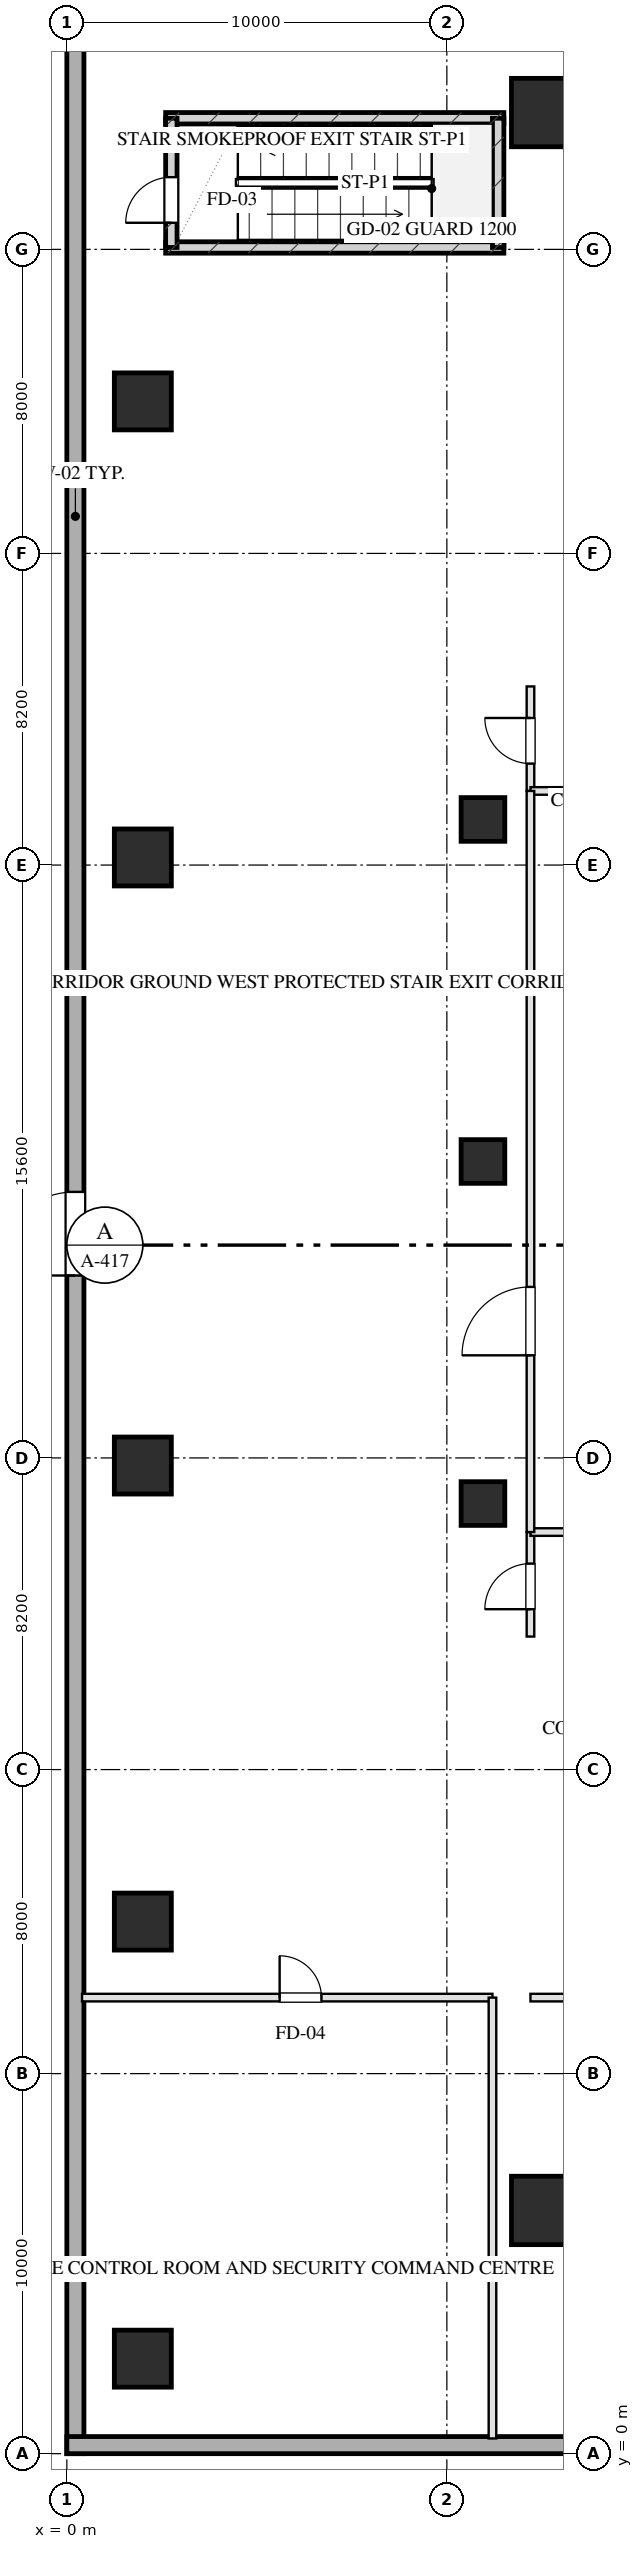
"""IFC4 building model, lengths in metres.
Left out: names, types, materials, properties, quantities, classifications, styles, units other than length and angle.
Written with IfcOpenShell. Run it as: python <this file> out.ifc"""

import sys

from ifc_helpers import new_model, si_unit, direction, frame, frame_2d, origin, origin_2d, place, context, subcontext, project, spatial, rectangle, hollow_rectangle, extrude, element, fill, save


model = new_model("IFC4")
c1 = context("Model", 3, precision=1e-05, world=origin(), true_north=direction((0.0, 1.0)))
c2 = subcontext(c1, "Body", "Model", "MODEL_VIEW")
j1 = project(units=[si_unit("LENGTHUNIT", "METRE"), si_unit("PLANEANGLEUNIT", "RADIAN")], contexts=[c1])
p1 = place(None, origin())
s1 = spatial("IfcSite", under=j1, at=p1, CompositionType="ELEMENT")
p2 = place(p1, origin())
s2 = spatial("IfcBuilding", under=s1, at=p2, CompositionType="ELEMENT")
p3 = place(p2, origin())
s3 = spatial("IfcBuildingStorey", under=s2, at=p3, CompositionType="ELEMENT", Elevation=0.0)
for number, where, z_axis, x_axis in (
    (1, (2.6, 58.05, 0.0), (0.0, 0.0, 1.0), (1.0, 0.0, 0.0)),
    (2, (2.6, 61.45, 0.0), (0.0, 0.0, 1.0), (1.0, 0.0, 0.0)),
):
    element("IfcWall", number, at=place(p3, frame(where, z_axis=z_axis, x_axis=x_axis)), inside=s3, PredefinedType="SHEAR", context=c2, shape_type="SweptSolid", body=[
        extrude(rectangle(XDim=8.9, YDim=0.3, at=frame_2d((4.45, 0.0))), origin(), (0.0, 0.0, 1.0), 6.0),
    ])
p4 = place(p3, frame((11.35, 58.05, 0.0), z_axis=(0.0, 0.0, 1.0), x_axis=(0.0, 1.0, 0.0)))
e3 = element("IfcWall", 3, at=p4, inside=s3, PredefinedType="SHEAR", context=c2, shape_type="SweptSolid", body=[
    extrude(rectangle(XDim=3.4, YDim=0.3, at=frame_2d((1.7, 0.0))), origin(), (0.0, 0.0, 1.0), 6.0),
])
p5 = place(p3, frame((2.75, 58.05, 0.0), z_axis=(0.0, 0.0, 1.0), x_axis=(0.0, 1.0, 0.0)))
e4 = element("IfcWall", 4, at=p5, inside=s3, PredefinedType="SHEAR", context=c2, shape_type="SweptSolid", body=[
    extrude(rectangle(XDim=3.4, YDim=0.3, at=frame_2d((1.7, 0.0))), origin(), (0.0, 0.0, 1.0), 6.0),
])
p6 = place(p5, frame((0.65, 0.0, 0.0)))
e5 = element("IfcOpeningElement", 5, at=p6, cuts=e4, PredefinedType="OPENING", context=c2, shape_type="SweptSolid", body=[
    extrude(rectangle(XDim=1.2, YDim=2.05, at=frame_2d((0.6, 1.025))), frame((0.0, 0.16, 0.0), z_axis=(0.0, -1.0, 0.0), x_axis=(1.0, 0.0, 0.0)), (0.0, 0.0, 1.0), 0.32),
])
for number, where, z_axis, x_axis in (
    (6, (2.0, 2.5, 0.0), (0.0, 0.0, 1.0), (1.0, 0.0, 0.0)),
    (7, (2.0, 14.0, 0.0), (0.0, 0.0, 1.0), (1.0, 0.0, 0.0)),
    (8, (2.0, 26.0, 0.0), (0.0, 0.0, 1.0), (1.0, 0.0, 0.0)),
    (9, (2.0, 42.0, 0.0), (0.0, 0.0, 1.0), (1.0, 0.0, 0.0)),
    (10, (2.0, 54.0, 0.0), (0.0, 0.0, 1.0), (1.0, 0.0, 0.0)),
):
    element("IfcColumn", number, at=place(p3, frame(where, z_axis=z_axis, x_axis=x_axis)), inside=s3, PredefinedType="COLUMN", context=c2, shape_type="SweptSolid", body=[
        extrude(rectangle(XDim=1.5, YDim=1.5, at=origin_2d()), origin(), (0.0, 0.0, 1.0), 6.001),
    ])
for number, where, z_axis, x_axis in (
    (11, (12.6, 6.4, 0.0), (0.0, 0.0, 1.0), (1.0, 0.0, 0.0)),
    (12, (12.6, 61.6, 0.0), (0.0, 0.0, 1.0), (1.0, 0.0, 0.0)),
):
    element("IfcColumn", number, at=place(p3, frame(where, z_axis=z_axis, x_axis=x_axis)), inside=s3, PredefinedType="COLUMN", context=c2, shape_type="SweptSolid", body=[
        extrude(hollow_rectangle(XDim=1.8, YDim=1.8, WallThickness=0.06, at=origin_2d()), origin(), (0.0, 0.0, 1.0), 6.001),
    ])
for number, where, z_axis, x_axis in (
    (13, (10.95, 25.0, 0.0), (0.0, 0.0, 1.0), (1.0, 0.0, 0.0)),
    (14, (10.95, 34.0, 0.0), (0.0, 0.0, 1.0), (1.0, 0.0, 0.0)),
    (15, (10.95, 43.0, 0.0), (0.0, 0.0, 1.0), (1.0, 0.0, 0.0)),
):
    element("IfcColumn", number, at=place(p3, frame(where, z_axis=z_axis, x_axis=x_axis)), inside=s3, PredefinedType="COLUMN", context=c2, shape_type="SweptSolid", body=[
        extrude(hollow_rectangle(XDim=1.15, YDim=1.15, WallThickness=0.04, at=origin_2d()), origin(), (0.0, 0.0, 1.0), 6.001),
    ])
p7 = place(p3, frame((0.225, 0.0, 0.0), z_axis=(0.0, 0.0, 1.0), x_axis=(0.0, 1.0, 0.0)))
e16 = element("IfcWall", 16, at=p7, inside=s3, PredefinedType="SOLIDWALL", context=c2, shape_type="SweptSolid", body=[
    extrude(rectangle(XDim=68.0, YDim=0.45, at=frame_2d((34.0, 0.0))), origin(), (0.0, 0.0, 1.0), 5.7),
])
p8 = place(p7, frame((31.0, 0.0, 0.0)))
e17 = element("IfcOpeningElement", 17, at=p8, cuts=e16, PredefinedType="OPENING", context=c2, shape_type="SweptSolid", body=[
    extrude(rectangle(XDim=2.2, YDim=2.4, at=frame_2d((1.1, 1.2))), frame((0.0, 0.235, 0.0), z_axis=(0.0, -1.0, 0.0), x_axis=(1.0, 0.0, 0.0)), (0.0, 0.0, 1.0), 0.47),
])
p9 = place(p3, frame((120.0, 0.225, 0.0), z_axis=(0.0, 0.0, 1.0), x_axis=(-1.0, 0.0, 0.0)))
e18 = element("IfcWall", 18, at=p9, inside=s3, PredefinedType="SOLIDWALL", context=c2, shape_type="SweptSolid", body=[
    extrude(rectangle(XDim=120.0, YDim=0.45, at=frame_2d((60.0, 0.0))), origin(), (0.0, 0.0, 1.0), 5.7),
])
p10 = place(p9, frame((13.0, 0.0, 0.0)))
e19 = element("IfcOpeningElement", 19, at=p10, cuts=e18, PredefinedType="OPENING", context=c2, shape_type="SweptSolid", body=[
    extrude(rectangle(XDim=2.2, YDim=2.4, at=frame_2d((1.1, 1.2))), frame((0.0, 0.235, 0.0), z_axis=(0.0, -1.0, 0.0), x_axis=(1.0, 0.0, 0.0)), (0.0, 0.0, 1.0), 0.47),
])
p11 = place(p9, frame((27.0, 0.0, 0.0)))
e20 = element("IfcOpeningElement", 20, at=p11, cuts=e18, PredefinedType="OPENING", context=c2, shape_type="SweptSolid", body=[
    extrude(rectangle(XDim=2.2, YDim=2.4, at=frame_2d((1.1, 1.2))), frame((0.0, 0.235, 0.0), z_axis=(0.0, -1.0, 0.0), x_axis=(1.0, 0.0, 0.0)), (0.0, 0.0, 1.0), 0.47),
])
p12 = place(p9, frame((51.0, 0.0, 0.0)))
e21 = element("IfcOpeningElement", 21, at=p12, cuts=e18, PredefinedType="OPENING", context=c2, shape_type="SweptSolid", body=[
    extrude(rectangle(XDim=2.2, YDim=2.4, at=frame_2d((1.1, 1.2))), frame((0.0, 0.235, 0.0), z_axis=(0.0, -1.0, 0.0), x_axis=(1.0, 0.0, 0.0)), (0.0, 0.0, 1.0), 0.47),
])
p13 = place(p9, frame((59.0, 0.0, 0.0)))
e22 = element("IfcOpeningElement", 22, at=p13, cuts=e18, PredefinedType="OPENING", context=c2, shape_type="SweptSolid", body=[
    extrude(rectangle(XDim=2.2, YDim=2.4, at=frame_2d((1.1, 1.2))), frame((0.0, 0.235, 0.0), z_axis=(0.0, -1.0, 0.0), x_axis=(1.0, 0.0, 0.0)), (0.0, 0.0, 1.0), 0.47),
])
p14 = place(p9, frame((67.0, 0.0, 0.0)))
e23 = element("IfcOpeningElement", 23, at=p14, cuts=e18, PredefinedType="OPENING", context=c2, shape_type="SweptSolid", body=[
    extrude(rectangle(XDim=2.2, YDim=2.4, at=frame_2d((1.1, 1.2))), frame((0.0, 0.235, 0.0), z_axis=(0.0, -1.0, 0.0), x_axis=(1.0, 0.0, 0.0)), (0.0, 0.0, 1.0), 0.47),
])
p15 = place(p9, frame((86.0, 0.0, 0.0)))
e24 = element("IfcOpeningElement", 24, at=p15, cuts=e18, PredefinedType="OPENING", context=c2, shape_type="SweptSolid", body=[
    extrude(rectangle(XDim=2.2, YDim=2.4, at=frame_2d((1.1, 1.2))), frame((0.0, 0.235, 0.0), z_axis=(0.0, -1.0, 0.0), x_axis=(1.0, 0.0, 0.0)), (0.0, 0.0, 1.0), 0.47),
])
p16 = place(p9, frame((104.0, 0.0, 0.0)))
e25 = element("IfcOpeningElement", 25, at=p16, cuts=e18, PredefinedType="OPENING", context=c2, shape_type="SweptSolid", body=[
    extrude(rectangle(XDim=2.2, YDim=2.4, at=frame_2d((1.1, 1.2))), frame((0.0, 0.235, 0.0), z_axis=(0.0, -1.0, 0.0), x_axis=(1.0, 0.0, 0.0)), (0.0, 0.0, 1.0), 0.47),
])
p17 = place(p3, frame((0.4, 12.0, 0.0), z_axis=(0.0, 0.0, 1.0), x_axis=(1.0, 0.0, 0.0)))
e26 = element("IfcWall", 26, at=p17, inside=s3, PredefinedType="PARTITIONING", context=c2, shape_type="SweptSolid", body=[
    extrude(rectangle(XDim=10.8, YDim=0.2, at=frame_2d((5.4, 0.0))), origin(), (0.0, 0.0, 1.0), 5.685),
])
p18 = place(p17, frame((5.2, 0.0, 0.0)))
e27 = element("IfcOpeningElement", 27, at=p18, cuts=e26, PredefinedType="OPENING", context=c2, shape_type="SweptSolid", body=[
    extrude(rectangle(XDim=1.1, YDim=2.05, at=frame_2d((0.55, 1.025))), frame((0.0, 0.11, 0.0), z_axis=(0.0, -1.0, 0.0), x_axis=(1.0, 0.0, 0.0)), (0.0, 0.0, 1.0), 0.22),
])
p19 = place(p3, frame((11.2, 0.4, 0.0), z_axis=(0.0, 0.0, 1.0), x_axis=(0.0, 1.0, 0.0)))
e28 = element("IfcWall", 28, at=p19, inside=s3, PredefinedType="PARTITIONING", context=c2, shape_type="SweptSolid", body=[
    extrude(rectangle(XDim=11.6, YDim=0.2, at=frame_2d((5.8, 0.0))), origin(), (0.0, 0.0, 1.0), 5.685),
])
p20 = place(p3, frame((12.2, 12.0, 0.0), z_axis=(0.0, 0.0, 1.0), x_axis=(1.0, 0.0, 0.0)))
e29 = element("IfcWall", 29, at=p20, inside=s3, PredefinedType="PARTITIONING", context=c2, shape_type="SweptSolid", body=[
    extrude(rectangle(XDim=9.4, YDim=0.2, at=frame_2d((4.7, 0.0))), origin(), (0.0, 0.0, 1.0), 5.685),
])
p21 = place(p3, frame((12.2, 21.5, 0.0), z_axis=(0.0, 0.0, 1.0), x_axis=(0.0, 1.0, 0.0)))
e30 = element("IfcWall", 30, at=p21, inside=s3, PredefinedType="PARTITIONING", context=c2, shape_type="SweptSolid", body=[
    extrude(rectangle(XDim=2.75, YDim=0.2, at=frame_2d((1.375, 0.0))), origin(), (0.0, 0.0, 1.0), 5.685),
])
p22 = place(p21, frame((0.72, 0.0, 0.0)))
e31 = element("IfcOpeningElement", 31, at=p22, cuts=e30, PredefinedType="OPENING", context=c2, shape_type="SweptSolid", body=[
    extrude(rectangle(XDim=1.2, YDim=2.05, at=frame_2d((0.6, 1.025))), frame((0.0, 0.11, 0.0), z_axis=(0.0, -1.0, 0.0), x_axis=(1.0, 0.0, 0.0)), (0.0, 0.0, 1.0), 0.22),
])
p23 = place(p3, frame((12.2, 24.25, 0.0), z_axis=(0.0, 0.0, 1.0), x_axis=(1.0, 0.0, 0.0)))
e32 = element("IfcWall", 32, at=p23, inside=s3, PredefinedType="PARTITIONING", context=c2, shape_type="SweptSolid", body=[
    extrude(rectangle(XDim=26.1, YDim=0.2, at=frame_2d((13.05, 0.0))), origin(), (0.0, 0.0, 1.0), 5.685),
])
p24 = place(p3, frame((12.2, 43.75, 0.0), z_axis=(0.0, 0.0, 1.0), x_axis=(0.0, 1.0, 0.0)))
e33 = element("IfcWall", 33, at=p24, inside=s3, PredefinedType="PARTITIONING", context=c2, shape_type="SweptSolid", body=[
    extrude(rectangle(XDim=2.75, YDim=0.2, at=frame_2d((1.375, 0.0))), origin(), (0.0, 0.0, 1.0), 5.685),
])
p25 = place(p24, frame((0.72, 0.0, 0.0)))
e34 = element("IfcOpeningElement", 34, at=p25, cuts=e33, PredefinedType="OPENING", context=c2, shape_type="SweptSolid", body=[
    extrude(rectangle(XDim=1.2, YDim=2.05, at=frame_2d((0.6, 1.025))), frame((0.0, 0.11, 0.0), z_axis=(0.0, -1.0, 0.0), x_axis=(1.0, 0.0, 0.0)), (0.0, 0.0, 1.0), 0.22),
])
p26 = place(p3, frame((12.2, 43.75, 0.0), z_axis=(0.0, 0.0, 1.0), x_axis=(1.0, 0.0, 0.0)))
e35 = element("IfcWall", 35, at=p26, inside=s3, PredefinedType="PARTITIONING", context=c2, shape_type="SweptSolid", body=[
    extrude(rectangle(XDim=26.1, YDim=0.2, at=frame_2d((13.05, 0.0))), origin(), (0.0, 0.0, 1.0), 5.685),
])
p27 = place(p3, frame((12.2, 24.25, 0.0), z_axis=(0.0, 0.0, 1.0), x_axis=(0.0, 1.0, 0.0)))
e36 = element("IfcWall", 36, at=p27, inside=s3, PredefinedType="PARTITIONING", context=c2, shape_type="SweptSolid", body=[
    extrude(rectangle(XDim=19.5, YDim=0.2, at=frame_2d((9.75, 0.0))), origin(), (0.0, 0.0, 1.0), 5.685),
])
p28 = place(p27, frame((4.65, 0.0, 0.0)))
e37 = element("IfcOpeningElement", 37, at=p28, cuts=e36, PredefinedType="OPENING", context=c2, shape_type="SweptSolid", body=[
    extrude(rectangle(XDim=1.8, YDim=2.05, at=frame_2d((0.9, 1.025))), frame((0.0, 0.11, 0.0), z_axis=(0.0, -1.0, 0.0), x_axis=(1.0, 0.0, 0.0)), (0.0, 0.0, 1.0), 0.22),
])
p29 = place(p8, origin())
e38 = element("IfcDoor", 38, at=p29, inside=s3, OperationType="SINGLE_SWING_LEFT", PredefinedType="DOOR", context=c2, shape_type="SweptSolid", body=[
    extrude(rectangle(XDim=2.2, YDim=2.4, at=frame_2d((1.1, 1.2))), frame((0.0, 0.025, 0.0), z_axis=(0.0, -1.0, 0.0), x_axis=(1.0, 0.0, 0.0)), (0.0, 0.0, 1.0), 0.05),
])
fill(e17, e38)
p30 = place(p18, origin())
e39 = element("IfcDoor", 39, at=p30, inside=s3, OperationType="SINGLE_SWING_LEFT", PredefinedType="DOOR", context=c2, shape_type="SweptSolid", body=[
    extrude(rectangle(XDim=1.1, YDim=2.05, at=frame_2d((0.55, 1.025))), frame((0.0, 0.025, 0.0), z_axis=(0.0, -1.0, 0.0), x_axis=(1.0, 0.0, 0.0)), (0.0, 0.0, 1.0), 0.05),
])
fill(e27, e39)
p31 = place(p22, origin())
e40 = element("IfcDoor", 40, at=p31, inside=s3, OperationType="SINGLE_SWING_LEFT", PredefinedType="DOOR", context=c2, shape_type="SweptSolid", body=[
    extrude(rectangle(XDim=1.2, YDim=2.05, at=frame_2d((0.6, 1.025))), frame((0.0, 0.025, 0.0), z_axis=(0.0, -1.0, 0.0), x_axis=(1.0, 0.0, 0.0)), (0.0, 0.0, 1.0), 0.05),
])
fill(e31, e40)
p32 = place(p25, origin())
e41 = element("IfcDoor", 41, at=p32, inside=s3, OperationType="SINGLE_SWING_RIGHT", PredefinedType="DOOR", context=c2, shape_type="SweptSolid", body=[
    extrude(rectangle(XDim=1.2, YDim=2.05, at=frame_2d((0.6, 1.025))), frame((0.0, 0.025, 0.0), z_axis=(0.0, -1.0, 0.0), x_axis=(1.0, 0.0, 0.0)), (0.0, 0.0, 1.0), 0.05),
])
fill(e34, e41)
p33 = place(p28, origin())
e42 = element("IfcDoor", 42, at=p33, inside=s3, OperationType="SINGLE_SWING_LEFT", PredefinedType="DOOR", context=c2, shape_type="SweptSolid", body=[
    extrude(rectangle(XDim=1.8, YDim=2.05, at=frame_2d((0.9, 1.025))), frame((0.0, 0.025, 0.0), z_axis=(0.0, -1.0, 0.0), x_axis=(1.0, 0.0, 0.0)), (0.0, 0.0, 1.0), 0.05),
])
fill(e37, e42)
p34 = place(p6, origin())
e43 = element("IfcDoor", 43, at=p34, inside=s3, OperationType="SINGLE_SWING_LEFT", PredefinedType="DOOR", context=c2, shape_type="SweptSolid", body=[
    extrude(rectangle(XDim=1.2, YDim=2.05, at=frame_2d((0.6, 1.025))), frame((0.0, 0.025, 0.0), z_axis=(0.0, -1.0, 0.0), x_axis=(1.0, 0.0, 0.0)), (0.0, 0.0, 1.0), 0.05),
])
fill(e5, e43)
save(model, sys.argv[1])
